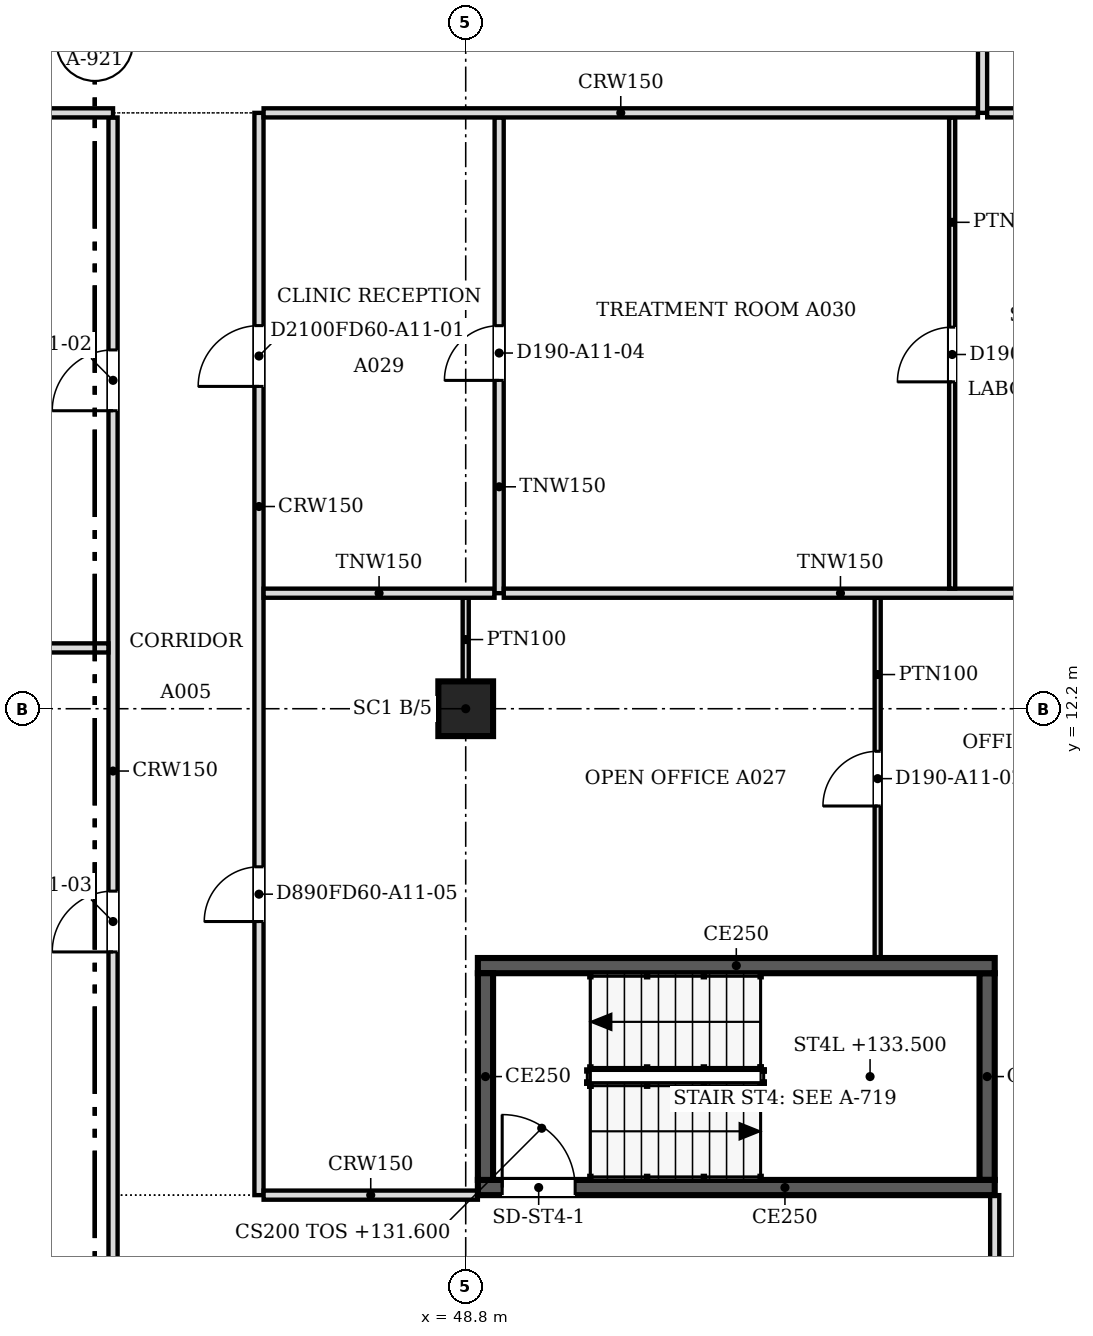
"""IFC4 building model, lengths in metres.
Left out: names, types, materials, properties, quantities, classifications, styles, units other than length and angle.
Written with IfcOpenShell. Run it as: python <this file> out.ifc"""

import sys

from ifc_helpers import new_model, si_unit, direction, frame, frame_2d, origin, origin_2d, place, context, subcontext, project, spatial, polyline, rectangle, outline, extrude, faceted_brep, source, transform, mapped, element, fill, save


model = new_model("IFC4")
c1 = context("Model", 3, precision=1e-05, world=origin(), true_north=direction((0.0, 1.0)))
c2 = subcontext(c1, "Body", "Model", "MODEL_VIEW")
j1 = project(units=[si_unit("LENGTHUNIT", "METRE"), si_unit("PLANEANGLEUNIT", "RADIAN")], contexts=[c1])
p1 = place(None, origin())
s1 = spatial("IfcSite", under=j1, at=p1, CompositionType="ELEMENT")
p2 = place(p1, origin())
s2 = spatial("IfcBuilding", under=s1, at=p2, CompositionType="ELEMENT")
p3 = place(p2, frame((0.0, 0.0, 131.6)))
s3 = spatial("IfcBuildingStorey", under=s2, at=p3, CompositionType="ELEMENT", Elevation=131.6)
p4 = place(p3, frame((48.8, 12.2, 0.0), z_axis=(0.0, 0.0, 1.0), x_axis=(1.0, 0.0, 0.0)))
e1 = element("IfcColumn", 1, at=p4, inside=s3, PredefinedType="COLUMN", context=c2, shape_type="SweptSolid", body=[
    extrude(rectangle(XDim=0.9, YDim=0.9, at=origin_2d()), origin(), (0.0, 0.0, 1.0), 3.6),
])
m1 = source(origin(), c2, "Body", "Brep", [
    faceted_brep([(0.053, -0.25, 0.0), (2.997, -0.25, 3.8), (0.053, -0.25, 7.6), (0.0, -0.25, 7.532), (0.0, -0.25, 0.068), (0.106, 0.25, 7.531), (2.944, 0.25, 3.868), (2.944, 0.25, 3.732), (0.106, 0.25, 0.068), (2.997, 0.0, 3.8), (0.053, 0.0, 0.0), (0.053, 0.0, 7.6)], [[[0, 1, 2, 3, 4]], [[5, 6, 7, 8]], [[8, 7, 9, 1, 0, 10]], [[6, 5, 11, 2, 1, 9]], [[3, 2, 11]], [[10, 0, 4]], [[8, 10, 4, 3, 11, 5]], [[7, 6, 9]]]),
])
p5 = place(p3, frame((57.569, 1.274, -3.8), z_axis=(0.0, 0.0, 1.0), x_axis=(0.707066050402, 0.707147509625, 0.0)))
e2 = element("IfcWall", 2, at=p5, inside=s3, PredefinedType="SOLIDWALL", context=c2, shape_type="MappedRepresentation", body=[
    mapped(m1, transform((0.0, 0.0, 0.0), scale=1.0)),
])
m2 = source(origin(), c2, "Body", "SweptSolid", [
    extrude(outline(polyline([(0.253, 0.666), (2.681, 3.8), (0.253, 6.934), (0.253, 0.666)])), frame((0.0, 0.26, 0.0), z_axis=(0.0, -1.0, 0.0), x_axis=(1.0, 0.0, 0.0)), (0.0, 0.0, 1.0), 0.52),
])
p6 = place(p5, origin())
e3 = element("IfcOpeningElement", 3, at=p6, cuts=e2, PredefinedType="OPENING", context=c2, shape_type="MappedRepresentation", body=[
    mapped(m2, transform((0.0, 0.0, 0.0), scale=1.0)),
])
p7 = place(p2, frame((0.0, 0.0, 135.4)))
s4 = spatial("IfcBuildingStorey", under=s2, at=p7, CompositionType="ELEMENT", Elevation=135.4)
m3 = source(origin(), c2, "Body", "Brep", [
    faceted_brep([(2.944, -0.25, 0.0), (2.997, -0.25, 0.068), (2.997, -0.25, 7.532), (2.944, -0.25, 7.6), (0.0, -0.25, 3.8), (0.053, 0.25, 3.868), (2.891, 0.25, 7.532), (2.891, 0.25, 0.068), (0.053, 0.25, 3.731), (2.944, 0.0, 0.0), (2.944, 0.0, 7.6), (0.0, 0.0, 3.8)], [[[0, 1, 2, 3, 4]], [[5, 6, 7, 8]], [[1, 0, 9]], [[10, 3, 2]], [[6, 5, 11, 4, 3, 10]], [[8, 7, 9, 0, 4, 11]], [[8, 11, 5]], [[1, 9, 7, 6, 10, 2]]]),
])
p8 = place(p7, frame((57.606, 1.312, -3.8), z_axis=(0.0, 0.0, 1.0), x_axis=(0.707147509625, 0.707066050402, 0.0)))
e4 = element("IfcWall", 4, at=p8, inside=s4, PredefinedType="SOLIDWALL", context=c2, shape_type="MappedRepresentation", body=[
    mapped(m3, transform((0.0, 0.0, 0.0), scale=1.0)),
])
m4 = source(origin(), c2, "Body", "SweptSolid", [
    extrude(outline(polyline([(2.744, 6.934), (0.316, 3.8), (2.744, 0.666), (2.744, 6.934)])), frame((0.0, 0.26, 0.0), z_axis=(0.0, -1.0, 0.0), x_axis=(1.0, 0.0, 0.0)), (0.0, 0.0, 1.0), 0.52),
])
p9 = place(p8, origin())
e5 = element("IfcOpeningElement", 5, at=p9, cuts=e4, PredefinedType="OPENING", context=c2, shape_type="MappedRepresentation", body=[
    mapped(m4, transform((0.0, 0.0, 0.0), scale=1.0)),
])
p10 = place(p3, frame((57.5, 4.325, 0.0), z_axis=(0.0, 0.0, 1.0), x_axis=(-1.0, 0.0, 0.0)))
e6 = element("IfcWall", 6, at=p10, inside=s3, PredefinedType="SOLIDWALL", context=c2, shape_type="SweptSolid", body=[
    extrude(rectangle(XDim=8.5, YDim=0.25, at=frame_2d((4.25, 0.0))), origin(), (0.0, 0.0, 1.0), 3.8),
])
m5 = source(origin(), c2, "Body", "SweptSolid", [
    extrude(rectangle(XDim=1.2, YDim=2.1, at=frame_2d((0.6, 1.05))), frame((0.0, 0.135, 0.0), z_axis=(0.0, -1.0, 0.0), x_axis=(1.0, 0.0, 0.0)), (0.0, 0.0, 1.0), 0.27),
])
p11 = place(p10, frame((6.9, 0.0, 0.0)))
e7 = element("IfcOpeningElement", 7, at=p11, cuts=e6, PredefinedType="OPENING", context=c2, shape_type="MappedRepresentation", body=[
    mapped(m5, transform((0.0, 0.0, 0.0), scale=1.0)),
])
p12 = place(p3, frame((49.125, 4.45, 0.0), z_axis=(0.0, 0.0, 1.0), x_axis=(0.0, 1.0, 0.0)))
e8 = element("IfcWall", 8, at=p12, inside=s3, PredefinedType="SOLIDWALL", context=c2, shape_type="SweptSolid", body=[
    extrude(rectangle(XDim=3.4, YDim=0.25, at=frame_2d((1.7, 0.0))), origin(), (0.0, 0.0, 1.0), 3.8),
])
p13 = place(p3, frame((49.0, 7.975, 0.0), z_axis=(0.0, 0.0, 1.0), x_axis=(1.0, 0.0, 0.0)))
e9 = element("IfcWall", 9, at=p13, inside=s3, PredefinedType="SOLIDWALL", context=c2, shape_type="SweptSolid", body=[
    extrude(rectangle(XDim=8.5, YDim=0.25, at=frame_2d((4.25, 0.0))), origin(), (0.0, 0.0, 1.0), 3.8),
])
p14 = place(p3, frame((57.375, 7.85, 0.0), z_axis=(0.0, 0.0, 1.0), x_axis=(0.0, -1.0, 0.0)))
e10 = element("IfcWall", 10, at=p14, inside=s3, PredefinedType="SOLIDWALL", context=c2, shape_type="SweptSolid", body=[
    extrude(rectangle(XDim=3.4, YDim=0.25, at=frame_2d((1.7, 0.0))), origin(), (0.0, 0.0, 1.0), 3.8),
])
p15 = place(p3, frame((43.0, 0.5, 0.0), z_axis=(0.0, 0.0, 1.0), x_axis=(0.0, 1.0, 0.0)))
e11 = element("IfcWall", 11, at=p15, inside=s3, PredefinedType="PARTITIONING", context=c2, shape_type="SweptSolid", body=[
    extrude(rectangle(XDim=21.424, YDim=0.15, at=frame_2d((10.712, 0.0))), origin(), (0.0, 0.0, 1.0), 3.067),
])
m6 = source(origin(), c2, "Body", "SweptSolid", [
    extrude(rectangle(XDim=1.0, YDim=2.1, at=frame_2d((0.5, 1.05))), frame((0.0, 0.085, 0.0), z_axis=(0.0, -1.0, 0.0), x_axis=(1.0, 0.0, 0.0)), (0.0, 0.0, 1.0), 0.17),
])
p16 = place(p15, frame((16.601, 0.0, 0.0)))
e12 = element("IfcOpeningElement", 12, at=p16, cuts=e11, PredefinedType="OPENING", context=c2, shape_type="MappedRepresentation", body=[
    mapped(m6, transform((0.0, 0.0, 0.0), scale=1.0)),
])
p17 = place(p15, frame((7.7, 0.0, 0.0)))
e13 = element("IfcOpeningElement", 13, at=p17, cuts=e11, PredefinedType="OPENING", context=c2, shape_type="MappedRepresentation", body=[
    mapped(m6, transform((0.0, 0.0, 0.0), scale=1.0)),
])
p18 = place(p3, frame((57.5, 1.559, 0.0), z_axis=(0.0, 0.0, 1.0), x_axis=(0.0, 1.0, 0.0)))
e14 = element("IfcWall", 14, at=p18, inside=s3, PredefinedType="PARTITIONING", context=c2, shape_type="SweptSolid", body=[
    extrude(rectangle(XDim=2.641, YDim=0.15, at=frame_2d((1.32, 0.0))), origin(), (0.0, 0.0, 1.0), 3.067),
])
p19 = place(p3, frame((45.4, 22.0, 0.0), z_axis=(0.0, 0.0, 1.0), x_axis=(0.0, -1.0, 0.0)))
e15 = element("IfcWall", 15, at=p19, inside=s3, PredefinedType="PARTITIONING", context=c2, shape_type="SweptSolid", body=[
    extrude(rectangle(XDim=17.8, YDim=0.15, at=frame_2d((8.9, 0.0))), origin(), (0.0, 0.0, 1.0), 3.067),
])
p20 = place(p19, frame((3.499, 0.0, 0.0)))
e16 = element("IfcOpeningElement", 16, at=p20, cuts=e15, PredefinedType="OPENING", context=c2, shape_type="MappedRepresentation", body=[
    mapped(m6, transform((0.0, 0.0, 0.0), scale=1.0)),
])
m7 = source(origin(), c2, "Body", "SweptSolid", [
    extrude(rectangle(XDim=0.9, YDim=2.1, at=frame_2d((0.45, 1.05))), frame((0.0, 0.085, 0.0), z_axis=(0.0, -1.0, 0.0), x_axis=(1.0, 0.0, 0.0)), (0.0, 0.0, 1.0), 0.17),
])
p21 = place(p19, frame((12.4, 0.0, 0.0)))
e17 = element("IfcOpeningElement", 17, at=p21, cuts=e15, PredefinedType="OPENING", context=c2, shape_type="MappedRepresentation", body=[
    mapped(m7, transform((0.0, 0.0, 0.0), scale=1.0)),
])
p22 = place(p3, frame((45.476, 4.2, 0.0), z_axis=(0.0, 0.0, 1.0), x_axis=(1.0, 0.0, 0.0)))
e18 = element("IfcWall", 18, at=p22, inside=s3, PredefinedType="PARTITIONING", context=c2, shape_type="SweptSolid", body=[
    extrude(rectangle(XDim=3.524, YDim=0.15, at=frame_2d((1.762, 0.0))), origin(), (0.0, 0.0, 1.0), 3.067),
])
p23 = place(p3, frame((55.575, 14.024, 0.0), z_axis=(0.0, 0.0, 1.0), x_axis=(0.0, -1.0, 0.0)))
e19 = element("IfcWall", 19, at=p23, inside=s3, PredefinedType="PARTITIONING", context=c2, shape_type="SweptSolid", body=[
    extrude(rectangle(XDim=5.924, YDim=0.1, at=frame_2d((2.962, 0.0))), origin(), (0.0, 0.0, 1.0), 3.067),
])
m8 = source(origin(), c2, "Body", "SweptSolid", [
    extrude(rectangle(XDim=0.9, YDim=2.1, at=frame_2d((0.45, 1.05))), frame((0.0, 0.06, 0.0), z_axis=(0.0, -1.0, 0.0), x_axis=(1.0, 0.0, 0.0)), (0.0, 0.0, 1.0), 0.12),
])
p24 = place(p23, frame((2.524, 0.0, 0.0)))
e20 = element("IfcOpeningElement", 20, at=p24, cuts=e19, PredefinedType="OPENING", context=c2, shape_type="MappedRepresentation", body=[
    mapped(m8, transform((0.0, 0.0, 0.0), scale=1.0)),
])
p25 = place(p3, frame((48.8, 12.65, 0.0), z_axis=(0.0, 0.0, 1.0), x_axis=(0.0, 1.0, 0.0)))
e21 = element("IfcWall", 21, at=p25, inside=s3, PredefinedType="PARTITIONING", context=c2, shape_type="SweptSolid", body=[
    extrude(rectangle(XDim=1.375, YDim=0.1, at=frame_2d((0.688, 0.0))), origin(), (0.0, 0.0, 1.0), 3.067),
])
p26 = place(p3, frame((24.55, 13.2, 0.0), z_axis=(0.0, 0.0, 1.0), x_axis=(1.0, 0.0, 0.0)))
e22 = element("IfcWall", 22, at=p26, inside=s3, PredefinedType="PARTITIONING", context=c2, shape_type="SweptSolid", body=[
    extrude(rectangle(XDim=18.374, YDim=0.15, at=frame_2d((9.187, 0.0))), origin(), (0.0, 0.0, 1.0), 3.067),
])
p27 = place(p3, frame((45.476, 14.1, 0.0), z_axis=(0.0, 0.0, 1.0), x_axis=(1.0, 0.0, 0.0)))
e23 = element("IfcWall", 23, at=p27, inside=s3, PredefinedType="PARTITIONING", context=c2, shape_type="SweptSolid", body=[
    extrude(rectangle(XDim=3.798, YDim=0.15, at=frame_2d((1.899, 0.0))), origin(), (0.0, 0.0, 1.0), 3.067),
])
p28 = place(p3, frame((49.35, 21.924, 0.0), z_axis=(0.0, 0.0, 1.0), x_axis=(0.0, -1.0, 0.0)))
e24 = element("IfcWall", 24, at=p28, inside=s3, PredefinedType="PARTITIONING", context=c2, shape_type="SweptSolid", body=[
    extrude(rectangle(XDim=7.824, YDim=0.15, at=frame_2d((3.912, 0.0))), origin(), (0.0, 0.0, 1.0), 3.067),
])
p29 = place(p28, frame((3.424, 0.0, 0.0)))
e25 = element("IfcOpeningElement", 25, at=p29, cuts=e24, PredefinedType="OPENING", context=c2, shape_type="MappedRepresentation", body=[
    mapped(m7, transform((0.0, 0.0, 0.0), scale=1.0)),
])
p30 = place(p3, frame((49.426, 14.1, 0.0), z_axis=(0.0, 0.0, 1.0), x_axis=(1.0, 0.0, 0.0)))
e26 = element("IfcWall", 26, at=p30, inside=s3, PredefinedType="PARTITIONING", context=c2, shape_type="SweptSolid", body=[
    extrude(rectangle(XDim=11.074, YDim=0.15, at=frame_2d((5.537, 0.0))), origin(), (0.0, 0.0, 1.0), 3.067),
])
p31 = place(p3, frame((56.8, 21.924, 0.0), z_axis=(0.0, 0.0, 1.0), x_axis=(0.0, -1.0, 0.0)))
e27 = element("IfcWall", 27, at=p31, inside=s3, PredefinedType="PARTITIONING", context=c2, shape_type="SweptSolid", body=[
    extrude(rectangle(XDim=7.748, YDim=0.1, at=frame_2d((3.874, 0.0))), origin(), (0.0, 0.0, 1.0), 3.067),
])
p32 = place(p31, frame((3.448, 0.0, 0.0)))
e28 = element("IfcOpeningElement", 28, at=p32, cuts=e27, PredefinedType="OPENING", context=c2, shape_type="MappedRepresentation", body=[
    mapped(m8, transform((0.0, 0.0, 0.0), scale=1.0)),
])
p33 = place(p3, frame((30.5, 22.0, 0.0), z_axis=(0.0, 0.0, 1.0), x_axis=(1.0, 0.0, 0.0)))
e29 = element("IfcWall", 29, at=p33, inside=s3, PredefinedType="PARTITIONING", context=c2, shape_type="SweptSolid", body=[
    extrude(rectangle(XDim=12.5, YDim=0.15, at=frame_2d((6.25, 0.0))), origin(), (0.0, 0.0, 1.0), 3.067),
])
p34 = place(p3, frame((45.476, 22.0, 0.0), z_axis=(0.0, 0.0, 1.0), x_axis=(1.0, 0.0, 0.0)))
e30 = element("IfcWall", 30, at=p34, inside=s3, PredefinedType="PARTITIONING", context=c2, shape_type="SweptSolid", body=[
    extrude(rectangle(XDim=11.748, YDim=0.15, at=frame_2d((5.874, 0.0))), origin(), (0.0, 0.0, 1.0), 3.067),
])
p35 = place(p3, frame((57.3, 30.6, 0.0), z_axis=(0.0, 0.0, 1.0), x_axis=(0.0, -1.0, 0.0)))
e31 = element("IfcWall", 31, at=p35, inside=s3, PredefinedType="PARTITIONING", context=c2, shape_type="SweptSolid", body=[
    extrude(rectangle(XDim=8.6, YDim=0.15, at=frame_2d((4.3, 0.0))), origin(), (0.0, 0.0, 1.0), 3.067),
])
p36 = place(p35, frame((3.9, 0.0, 0.0)))
e32 = element("IfcOpeningElement", 32, at=p36, cuts=e31, PredefinedType="OPENING", context=c2, shape_type="MappedRepresentation", body=[
    mapped(m7, transform((0.0, 0.0, 0.0), scale=1.0)),
])
p37 = place(p3, frame((57.376, 22.0, 0.0), z_axis=(0.0, 0.0, 1.0), x_axis=(1.0, 0.0, 0.0)))
e33 = element("IfcWall", 33, at=p37, inside=s3, PredefinedType="PARTITIONING", context=c2, shape_type="SweptSolid", body=[
    extrude(rectangle(XDim=3.124, YDim=0.15, at=frame_2d((1.562, 0.0))), origin(), (0.0, 0.0, 1.0), 3.067),
])
m9 = source(origin(), c2, "Body", "SweptSolid", [
    extrude(rectangle(XDim=1.2, YDim=2.1, at=frame_2d((0.6, 1.05))), frame((0.0, 0.025, 0.0), z_axis=(0.0, -1.0, 0.0), x_axis=(1.0, 0.0, 0.0)), (0.0, 0.0, 1.0), 0.05),
])
p38 = place(p11, origin())
e34 = element("IfcDoor", 34, at=p38, inside=s3, OperationType="SINGLE_SWING_RIGHT", PredefinedType="DOOR", context=c2, shape_type="MappedRepresentation", body=[
    mapped(m9, transform((0.0, 0.0, 0.0), scale=1.0)),
])
fill(e7, e34)
m10 = source(origin(), c2, "Body", "SweptSolid", [
    extrude(rectangle(XDim=0.9, YDim=2.1, at=frame_2d((0.45, 1.05))), frame((0.0, 0.025, 0.0), z_axis=(0.0, -1.0, 0.0), x_axis=(1.0, 0.0, 0.0)), (0.0, 0.0, 1.0), 0.05),
])
p39 = place(p24, origin())
e35 = element("IfcDoor", 35, at=p39, inside=s3, OperationType="SINGLE_SWING_RIGHT", PredefinedType="DOOR", context=c2, shape_type="MappedRepresentation", body=[
    mapped(m10, transform((0.0, 0.0, 0.0), scale=1.0)),
])
fill(e20, e35)
p40 = place(p32, origin())
e36 = element("IfcDoor", 36, at=p40, inside=s3, OperationType="SINGLE_SWING_RIGHT", PredefinedType="DOOR", context=c2, shape_type="MappedRepresentation", body=[
    mapped(m10, transform((0.0, 0.0, 0.0), scale=1.0)),
])
fill(e28, e36)
p41 = place(p29, origin())
e37 = element("IfcDoor", 37, at=p41, inside=s3, OperationType="SINGLE_SWING_RIGHT", PredefinedType="DOOR", context=c2, shape_type="MappedRepresentation", body=[
    mapped(m10, transform((0.0, 0.0, 0.0), scale=1.0)),
])
fill(e25, e37)
m11 = source(origin(), c2, "Body", "SweptSolid", [
    extrude(rectangle(XDim=1.0, YDim=2.1, at=frame_2d((0.5, 1.05))), frame((0.0, 0.025, 0.0), z_axis=(0.0, -1.0, 0.0), x_axis=(1.0, 0.0, 0.0)), (0.0, 0.0, 1.0), 0.05),
])
p42 = place(p20, origin())
e38 = element("IfcDoor", 38, at=p42, inside=s3, OperationType="SINGLE_SWING_RIGHT", PredefinedType="DOOR", context=c2, shape_type="MappedRepresentation", body=[
    mapped(m11, transform((0.0, 0.0, 0.0), scale=1.0)),
])
fill(e16, e38)
p43 = place(p16, origin())
e39 = element("IfcDoor", 39, at=p43, inside=s3, OperationType="SINGLE_SWING_LEFT", PredefinedType="DOOR", context=c2, shape_type="MappedRepresentation", body=[
    mapped(m11, transform((0.0, 0.0, 0.0), scale=1.0)),
])
fill(e12, e39)
p44 = place(p17, origin())
e40 = element("IfcDoor", 40, at=p44, inside=s3, OperationType="SINGLE_SWING_LEFT", PredefinedType="DOOR", context=c2, shape_type="MappedRepresentation", body=[
    mapped(m11, transform((0.0, 0.0, 0.0), scale=1.0)),
])
fill(e13, e40)
p45 = place(p21, origin())
e41 = element("IfcDoor", 41, at=p45, inside=s3, OperationType="SINGLE_SWING_RIGHT", PredefinedType="DOOR", context=c2, shape_type="MappedRepresentation", body=[
    mapped(m10, transform((0.0, 0.0, 0.0), scale=1.0)),
])
fill(e17, e41)
save(model, sys.argv[1])
